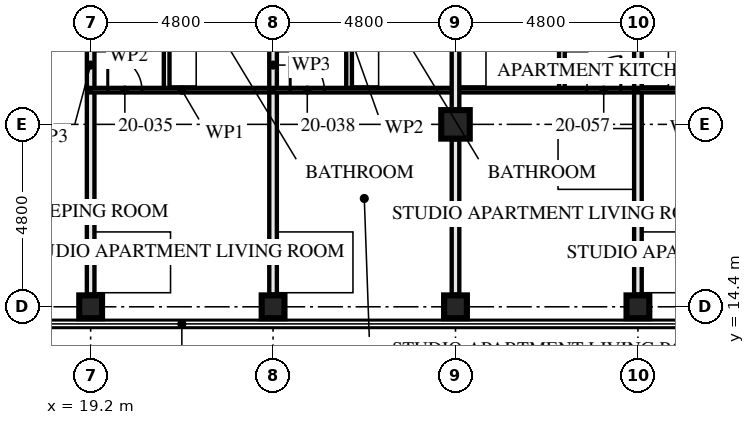
"""IFC4 building model, lengths in metres.
Left out: names, types, materials, properties, quantities, classifications, styles, units other than length and angle.
Written with IfcOpenShell. Run it as: python <this file> out.ifc"""

import sys

from ifc_helpers import new_model, si_unit, direction, frame, frame_2d, origin, origin_2d, place, context, subcontext, project, spatial, rectangle, hollow_rectangle, extrude, element, fill, save


model = new_model("IFC4")
c1 = context("Model", 3, precision=1e-05, world=origin(), true_north=direction((0.0, 1.0)))
c2 = subcontext(c1, "Body", "Model", "MODEL_VIEW")
j1 = project(units=[si_unit("LENGTHUNIT", "METRE"), si_unit("PLANEANGLEUNIT", "RADIAN")], contexts=[c1])
p1 = place(None, origin())
s1 = spatial("IfcSite", under=j1, at=p1, CompositionType="ELEMENT")
p2 = place(p1, origin())
s2 = spatial("IfcBuilding", under=s1, at=p2, CompositionType="ELEMENT")
p3 = place(p2, frame((0.0, 0.0, 76.0)))
s3 = spatial("IfcBuildingStorey", under=s2, at=p3, CompositionType="ELEMENT", Elevation=76.0)
for number, where, z_axis, x_axis in (
    (1, (19.2, 14.4, 0.0), (0.0, 0.0, 1.0), (0.0, 1.0, 0.0)),
    (2, (24.0, 14.4, 0.0), (0.0, 0.0, 1.0), (0.0, 1.0, 0.0)),
    (3, (28.8, 14.4, 0.0), (0.0, 0.0, 1.0), (0.0, 1.0, 0.0)),
):
    element("IfcColumn", number, at=place(p3, frame(where, z_axis=z_axis, x_axis=x_axis)), inside=s3, PredefinedType="COLUMN", context=c2, shape_type="SweptSolid", body=[
        extrude(hollow_rectangle(XDim=0.6, YDim=0.6, WallThickness=0.08, at=origin_2d()), origin(), (0.0, 0.0, 1.0), 3.5),
    ])
p4 = place(p3, frame((28.8, 19.2, 0.0), z_axis=(0.0, 0.0, 1.0), x_axis=(1.0, 0.0, 0.0)))
e4 = element("IfcColumn", 4, at=p4, inside=s3, PredefinedType="COLUMN", context=c2, shape_type="SweptSolid", body=[
    extrude(hollow_rectangle(XDim=0.75, YDim=0.75, WallThickness=0.08, at=origin_2d()), origin(), (0.0, 0.0, 1.0), 3.5),
])
p5 = place(p3, frame((33.6, 14.4, 0.0), z_axis=(0.0, 0.0, 1.0), x_axis=(0.0, 1.0, 0.0)))
e5 = element("IfcColumn", 5, at=p5, inside=s3, PredefinedType="COLUMN", context=c2, shape_type="SweptSolid", body=[
    extrude(hollow_rectangle(XDim=0.6, YDim=0.6, WallThickness=0.08, at=origin_2d()), origin(), (0.0, 0.0, 1.0), 3.5),
])
p6 = place(p3, frame((19.2, 14.72, 0.0), z_axis=(0.0, 0.0, 1.0), x_axis=(0.0, 1.0, 0.0)))
e6 = element("IfcWall", 6, at=p6, inside=s3, PredefinedType="PARTITIONING", context=c2, shape_type="SweptSolid", body=[
    extrude(rectangle(XDim=12.08, YDim=0.2, at=frame_2d((6.04, 0.0))), origin(), (0.0, 0.0, 1.0), 2.04),
])
p7 = place(p3, frame((21.2, 20.1, 0.0), z_axis=(0.0, 0.0, 1.0), x_axis=(0.0, 1.0, 0.0)))
e7 = element("IfcWall", 7, at=p7, inside=s3, PredefinedType="PARTITIONING", context=c2, shape_type="SweptSolid", body=[
    extrude(rectangle(XDim=3.0, YDim=0.15, at=frame_2d((1.5, 0.0))), origin(), (0.0, 0.0, 1.0), 3.25),
])
p8 = place(p3, frame((19.2, 20.1, 0.0), z_axis=(0.0, 0.0, 1.0), x_axis=(1.0, 0.0, 0.0)))
e8 = element("IfcWall", 8, at=p8, inside=s3, PredefinedType="PARTITIONING", context=c2, shape_type="SweptSolid", body=[
    extrude(rectangle(XDim=4.8, YDim=0.12, at=frame_2d((2.4, 0.0))), origin(), (0.0, 0.0, 1.0), 3.25),
])
p9 = place(p8, frame((0.45, 0.0, 0.0)))
e9 = element("IfcOpeningElement", 9, at=p9, cuts=e8, PredefinedType="OPENING", context=c2, shape_type="SweptSolid", body=[
    extrude(rectangle(XDim=0.9, YDim=2.1, at=frame_2d((0.45, 1.05))), frame((0.0, 0.071, 0.0), z_axis=(0.0, -1.0, 0.0), x_axis=(1.0, 0.0, 0.0)), (0.0, 0.0, 1.0), 0.141),
])
p10 = place(p3, frame((24.0, 14.72, 0.0), z_axis=(0.0, 0.0, 1.0), x_axis=(0.0, 1.0, 0.0)))
e10 = element("IfcWall", 10, at=p10, inside=s3, PredefinedType="PARTITIONING", context=c2, shape_type="SweptSolid", body=[
    extrude(rectangle(XDim=12.08, YDim=0.2, at=frame_2d((6.04, 0.0))), origin(), (0.0, 0.0, 1.0), 2.04),
])
p11 = place(p3, frame((26.0, 20.1, 0.0), z_axis=(0.0, 0.0, 1.0), x_axis=(0.0, 1.0, 0.0)))
e11 = element("IfcWall", 11, at=p11, inside=s3, PredefinedType="PARTITIONING", context=c2, shape_type="SweptSolid", body=[
    extrude(rectangle(XDim=3.0, YDim=0.15, at=frame_2d((1.5, 0.0))), origin(), (0.0, 0.0, 1.0), 3.25),
])
p12 = place(p3, frame((24.0, 20.1, 0.0), z_axis=(0.0, 0.0, 1.0), x_axis=(1.0, 0.0, 0.0)))
e12 = element("IfcWall", 12, at=p12, inside=s3, PredefinedType="PARTITIONING", context=c2, shape_type="SweptSolid", body=[
    extrude(rectangle(XDim=4.8, YDim=0.12, at=frame_2d((2.4, 0.0))), origin(), (0.0, 0.0, 1.0), 3.25),
])
p13 = place(p12, frame((0.45, 0.0, 0.0)))
e13 = element("IfcOpeningElement", 13, at=p13, cuts=e12, PredefinedType="OPENING", context=c2, shape_type="SweptSolid", body=[
    extrude(rectangle(XDim=0.9, YDim=2.1, at=frame_2d((0.45, 1.05))), frame((0.0, 0.071, 0.0), z_axis=(0.0, -1.0, 0.0), x_axis=(1.0, 0.0, 0.0)), (0.0, 0.0, 1.0), 0.141),
])
p14 = place(p3, frame((31.6, 20.1, 0.0), z_axis=(0.0, 0.0, 1.0), x_axis=(0.0, 1.0, 0.0)))
e14 = element("IfcWall", 14, at=p14, inside=s3, PredefinedType="PARTITIONING", context=c2, shape_type="SweptSolid", body=[
    extrude(rectangle(XDim=3.0, YDim=0.15, at=frame_2d((1.5, 0.0))), origin(), (0.0, 0.0, 1.0), 3.25),
])
p15 = place(p3, frame((28.8, 20.1, 0.0), z_axis=(0.0, 0.0, 1.0), x_axis=(1.0, 0.0, 0.0)))
e15 = element("IfcWall", 15, at=p15, inside=s3, PredefinedType="PARTITIONING", context=c2, shape_type="SweptSolid", body=[
    extrude(rectangle(XDim=4.8, YDim=0.12, at=frame_2d((2.4, 0.0))), origin(), (0.0, 0.0, 1.0), 3.25),
])
p16 = place(p15, frame((3.45, 0.0, 0.0)))
e16 = element("IfcOpeningElement", 16, at=p16, cuts=e15, PredefinedType="OPENING", context=c2, shape_type="SweptSolid", body=[
    extrude(rectangle(XDim=0.9, YDim=2.1, at=frame_2d((0.45, 1.05))), frame((0.0, 0.071, 0.0), z_axis=(0.0, -1.0, 0.0), x_axis=(1.0, 0.0, 0.0)), (0.0, 0.0, 1.0), 0.141),
])
p17 = place(p3, frame((33.6, 14.72, 0.0), z_axis=(0.0, 0.0, 1.0), x_axis=(0.0, 1.0, 0.0)))
e17 = element("IfcWall", 17, at=p17, inside=s3, PredefinedType="PARTITIONING", context=c2, shape_type="SweptSolid", body=[
    extrude(rectangle(XDim=12.08, YDim=0.2, at=frame_2d((6.04, 0.0))), origin(), (0.0, 0.0, 1.0), 2.04),
])
p18 = place(p3, frame((33.6, 20.1, 0.0), z_axis=(0.0, 0.0, 1.0), x_axis=(1.0, 0.0, 0.0)))
e18 = element("IfcWall", 18, at=p18, inside=s3, PredefinedType="PARTITIONING", context=c2, shape_type="SweptSolid", body=[
    extrude(rectangle(XDim=4.8, YDim=0.12, at=frame_2d((2.4, 0.0))), origin(), (0.0, 0.0, 1.0), 3.25),
])
p19 = place(p18, frame((3.45, 0.0, 0.0)))
e19 = element("IfcOpeningElement", 19, at=p19, cuts=e18, PredefinedType="OPENING", context=c2, shape_type="SweptSolid", body=[
    extrude(rectangle(XDim=0.9, YDim=2.1, at=frame_2d((0.45, 1.05))), frame((0.0, 0.071, 0.0), z_axis=(0.0, -1.0, 0.0), x_axis=(1.0, 0.0, 0.0)), (0.0, 0.0, 1.0), 0.141),
])
p20 = place(p3, frame((28.8, 14.72, 0.0), z_axis=(0.0, 0.0, 1.0), x_axis=(0.0, 1.0, 0.0)))
e20 = element("IfcWall", 20, at=p20, inside=s3, PredefinedType="PARTITIONING", context=c2, shape_type="SweptSolid", body=[
    extrude(rectangle(XDim=4.085, YDim=0.2, at=frame_2d((2.042, 0.0))), origin(), (0.0, 0.0, 1.0), 2.04),
])
p21 = place(p3, frame((28.8, 19.595, 0.0), z_axis=(0.0, 0.0, 1.0), x_axis=(0.0, 1.0, 0.0)))
e21 = element("IfcWall", 21, at=p21, inside=s3, PredefinedType="PARTITIONING", context=c2, shape_type="SweptSolid", body=[
    extrude(rectangle(XDim=4.01, YDim=0.2, at=frame_2d((2.005, 0.0))), origin(), (0.0, 0.0, 1.0), 2.04),
])
p22 = place(p9, origin())
e22 = element("IfcDoor", 22, at=p22, inside=s3, OperationType="SINGLE_SWING_RIGHT", PredefinedType="DOOR", context=c2, shape_type="SweptSolid", body=[
    extrude(rectangle(XDim=0.9, YDim=2.1, at=frame_2d((0.45, 1.05))), frame((0.0, 0.022, 0.0), z_axis=(0.0, -1.0, 0.0), x_axis=(1.0, 0.0, 0.0)), (0.0, 0.0, 1.0), 0.044),
])
fill(e9, e22)
p23 = place(p13, origin())
e23 = element("IfcDoor", 23, at=p23, inside=s3, OperationType="SINGLE_SWING_RIGHT", PredefinedType="DOOR", context=c2, shape_type="SweptSolid", body=[
    extrude(rectangle(XDim=0.9, YDim=2.1, at=frame_2d((0.45, 1.05))), frame((0.0, 0.022, 0.0), z_axis=(0.0, -1.0, 0.0), x_axis=(1.0, 0.0, 0.0)), (0.0, 0.0, 1.0), 0.044),
])
fill(e13, e23)
p24 = place(p16, origin())
e24 = element("IfcDoor", 24, at=p24, inside=s3, OperationType="SINGLE_SWING_LEFT", PredefinedType="DOOR", context=c2, shape_type="SweptSolid", body=[
    extrude(rectangle(XDim=0.9, YDim=2.1, at=frame_2d((0.45, 1.05))), frame((0.0, 0.022, 0.0), z_axis=(0.0, -1.0, 0.0), x_axis=(1.0, 0.0, 0.0)), (0.0, 0.0, 1.0), 0.044),
])
fill(e16, e24)
save(model, sys.argv[1])
